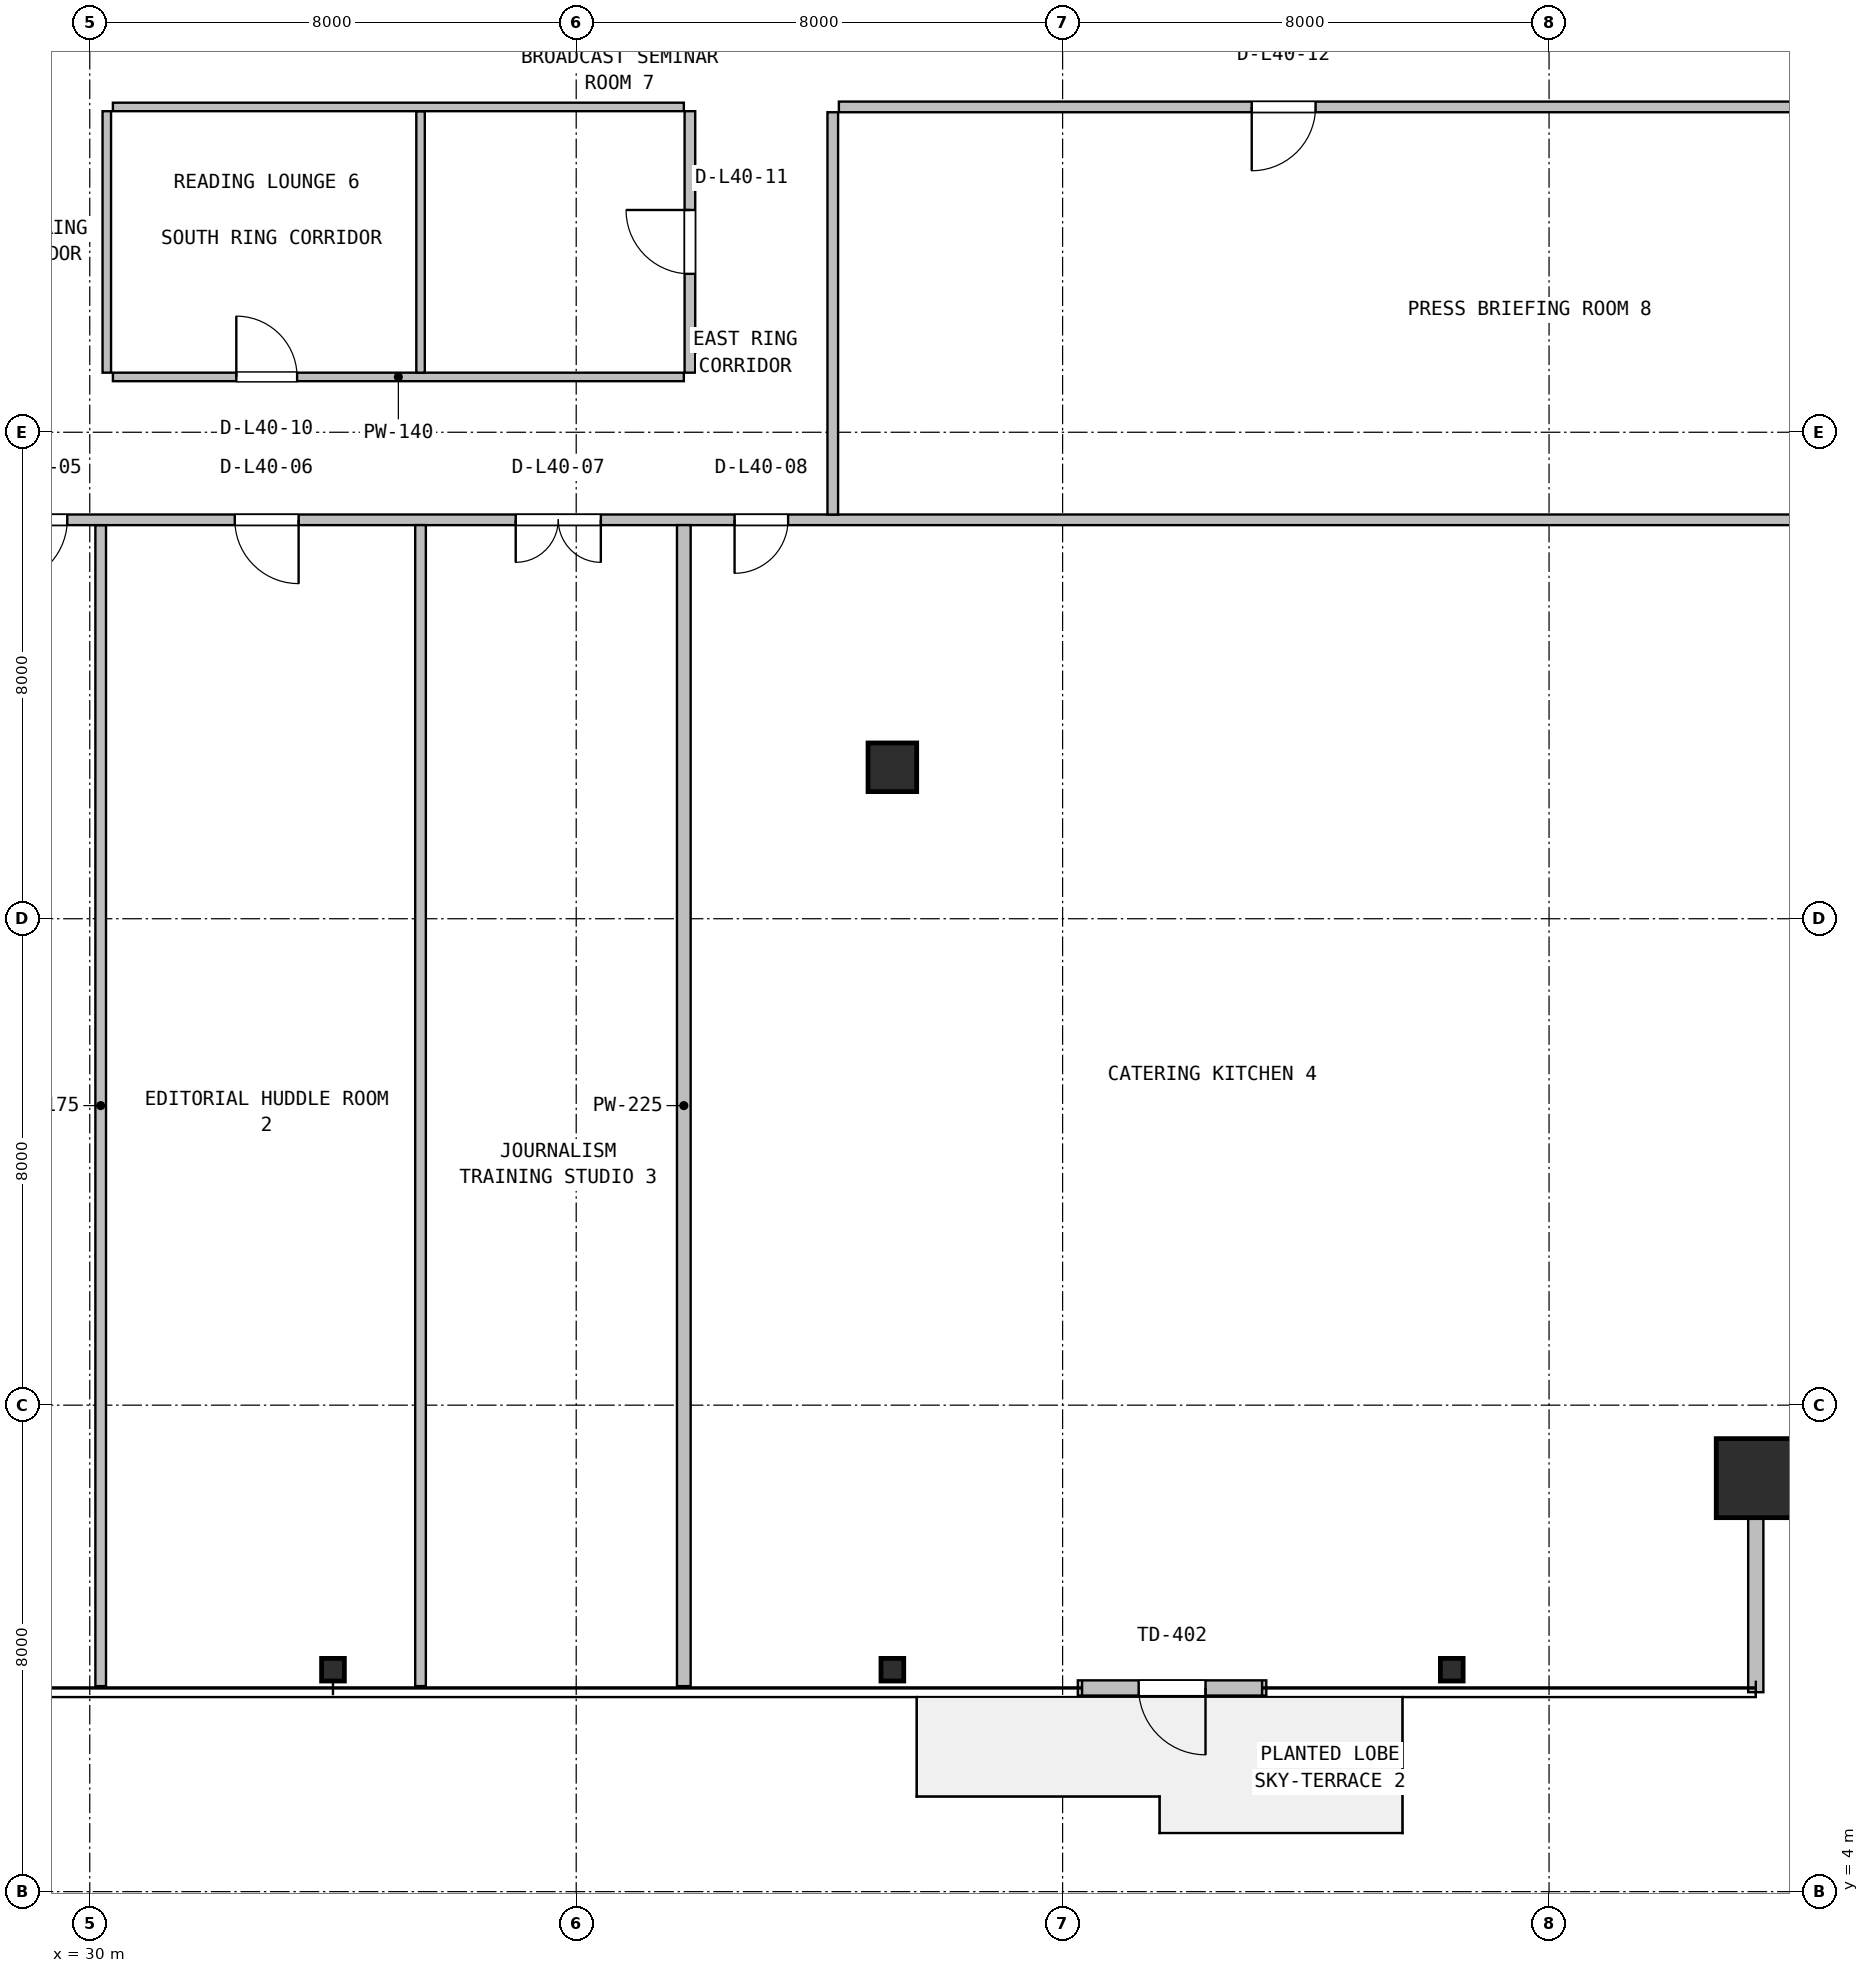
"""IFC4 building model, lengths in metres.
Left out: names, types, materials, properties, quantities, classifications, styles, units other than length and angle.
Written with IfcOpenShell. Run it as: python <this file> out.ifc"""

import sys

from ifc_helpers import new_model, si_unit, direction, frame, frame_2d, origin, origin_2d, place, context, subcontext, project, spatial, rectangle, hollow_rectangle, i_section, extrude, source, transform, mapped, element, fill, save


model = new_model("IFC4")
c1 = context("Model", 3, precision=1e-05, world=origin(), true_north=direction((0.0, 1.0)))
c2 = subcontext(c1, "Body", "Model", "MODEL_VIEW")
j1 = project(units=[si_unit("LENGTHUNIT", "METRE"), si_unit("PLANEANGLEUNIT", "RADIAN")], contexts=[c1])
p1 = place(None, origin())
s1 = spatial("IfcSite", under=j1, at=p1, CompositionType="ELEMENT")
p2 = place(p1, origin())
s2 = spatial("IfcBuilding", under=s1, at=p2, CompositionType="ELEMENT")
p3 = place(p2, frame((0.0, 0.0, 164.8)))
s3 = spatial("IfcBuildingStorey", under=s2, at=p3, CompositionType="ELEMENT", Elevation=164.8)
m1 = source(origin(), c2, "Body", "SweptSolid", [
    extrude(hollow_rectangle(XDim=1.3, YDim=1.3, WallThickness=0.05, at=origin_2d()), origin(), (0.0, 0.0, 1.0), 3.8),
])
p4 = place(p3, frame((57.4, 10.8, 0.0), z_axis=(0.0, 0.0, 1.0), x_axis=(1.0, 0.0, 0.0)))
e1 = element("IfcColumn", 1, at=p4, inside=s3, PredefinedType="COLUMN", context=c2, shape_type="MappedRepresentation", body=[
    mapped(m1, transform((0.0, 0.0, 0.0), x_axis=(1.0, 0.0, 0.0), y_axis=(0.0, 1.0, 0.0), z_axis=(0.0, 0.0, 1.0), scale=1.0)),
])
m2 = source(origin(), c2, "Body", "SweptSolid", [
    extrude(i_section(OverallWidth=0.374, OverallDepth=0.372, WebThickness=0.016, FlangeThickness=0.026, FilletRadius=0.016, at=origin_2d()), origin(), (0.0, 0.0, 1.0), 3.8),
])
for number, where, z_axis, x_axis in (
    (2, (34.0, 7.65, 0.0), (0.0, 0.0, 1.0), (1.0, 0.0, 0.0)),
    (3, (43.2, 7.65, 0.0), (0.0, 0.0, 1.0), (1.0, 0.0, 0.0)),
    (4, (52.4, 7.65, 0.0), (0.0, 0.0, 1.0), (1.0, 0.0, 0.0)),
):
    element("IfcColumn", number, at=place(p3, frame(where, z_axis=z_axis, x_axis=x_axis)), inside=s3, PredefinedType="COLUMN", context=c2, shape_type="MappedRepresentation", body=[
        mapped(m2, transform((0.0, 0.0, 0.0), x_axis=(1.0, 0.0, 0.0), y_axis=(0.0, 1.0, 0.0), z_axis=(0.0, 0.0, 1.0), scale=1.0)),
    ])
m3 = source(origin(), c2, "Body", "SweptSolid", [
    extrude(rectangle(XDim=0.8, YDim=0.8, at=origin_2d()), origin(), (0.0, 0.0, 1.0), 3.8),
])
p5 = place(p3, frame((43.2, 22.49, 0.0), z_axis=(0.0, 0.0, 1.0), x_axis=(1.0, 0.0, 0.0)))
e5 = element("IfcColumn", 5, at=p5, inside=s3, PredefinedType="COLUMN", context=c2, shape_type="MappedRepresentation", body=[
    mapped(m3, transform((0.0, 0.0, 0.0), x_axis=(1.0, 0.0, 0.0), y_axis=(0.0, 1.0, 0.0), z_axis=(0.0, 0.0, 1.0), scale=1.0)),
])
p6 = place(p3, frame((46.25, 7.35, 0.0), z_axis=(0.0, 0.0, 1.0), x_axis=(1.0, 0.0, 0.0)))
e6 = element("IfcWall", 6, at=p6, inside=s3, PredefinedType="SOLIDWALL", context=c2, shape_type="SweptSolid", body=[
    extrude(rectangle(XDim=3.1, YDim=0.25, at=frame_2d((1.55, 0.0))), origin(), (0.0, 0.0, 1.0), 3.53),
])
p7 = place(p6, frame((1.0, 0.0, 0.0)))
e7 = element("IfcOpeningElement", 7, at=p7, cuts=e6, PredefinedType="OPENING", context=c2, shape_type="SweptSolid", body=[
    extrude(rectangle(XDim=1.1, YDim=2.15, at=frame_2d((0.55, 1.075))), frame((0.0, 0.135, 0.0), z_axis=(0.0, -1.0, 0.0), x_axis=(1.0, 0.0, 0.0)), (0.0, 0.0, 1.0), 0.27),
])
p8 = place(p3, frame((57.4, 7.28, 0.0), z_axis=(0.0, 0.0, 1.0), x_axis=(0.0, 1.0, 0.0)))
e8 = element("IfcWall", 8, at=p8, inside=s3, PredefinedType="SOLIDWALL", context=c2, shape_type="SweptSolid", body=[
    extrude(rectangle(XDim=3.6, YDim=0.25, at=frame_2d((1.8, 0.0))), origin(), (0.0, 0.0, 1.0), 3.108),
])
p9 = place(p3, frame((30.18, 7.38, 0.0), z_axis=(0.0, 0.0, 1.0), x_axis=(0.0, 1.0, 0.0)))
e9 = element("IfcWall", 9, at=p9, inside=s3, PredefinedType="PARTITIONING", context=c2, shape_type="SweptSolid", body=[
    extrude(rectangle(XDim=19.093, YDim=0.175, at=frame_2d((9.546, 0.0))), origin(), (0.0, 0.0, 1.0), 2.909),
])
p10 = place(p3, frame((7.18, 26.56, 0.0), z_axis=(0.0, 0.0, 1.0), x_axis=(1.0, 0.0, 0.0)))
e10 = element("IfcWall", 10, at=p10, inside=s3, PredefinedType="PARTITIONING", context=c2, shape_type="SweptSolid", body=[
    extrude(rectangle(XDim=53.64, YDim=0.175, at=frame_2d((26.82, 0.0))), origin(), (0.0, 0.0, 1.0), 2.909),
])
p11 = place(p10, frame((21.4, 0.0, 0.0)))
e11 = element("IfcOpeningElement", 11, at=p11, cuts=e10, PredefinedType="OPENING", context=c2, shape_type="SweptSolid", body=[
    extrude(rectangle(XDim=1.05, YDim=2.1, at=frame_2d((0.525, 1.05))), frame((0.0, 0.098, 0.0), z_axis=(0.0, -1.0, 0.0), x_axis=(1.0, 0.0, 0.0)), (0.0, 0.0, 1.0), 0.195),
])
p12 = place(p10, frame((25.205, 0.0, 0.0)))
e12 = element("IfcOpeningElement", 12, at=p12, cuts=e10, PredefinedType="OPENING", context=c2, shape_type="SweptSolid", body=[
    extrude(rectangle(XDim=1.05, YDim=2.1, at=frame_2d((0.525, 1.05))), frame((0.0, 0.098, 0.0), z_axis=(0.0, -1.0, 0.0), x_axis=(1.0, 0.0, 0.0)), (0.0, 0.0, 1.0), 0.195),
])
p13 = place(p10, frame((29.825, 0.0, 0.0)))
e13 = element("IfcOpeningElement", 13, at=p13, cuts=e10, PredefinedType="OPENING", context=c2, shape_type="SweptSolid", body=[
    extrude(rectangle(XDim=1.4, YDim=2.12, at=frame_2d((0.7, 1.06))), frame((0.0, 0.098, 0.0), z_axis=(0.0, -1.0, 0.0), x_axis=(1.0, 0.0, 0.0)), (0.0, 0.0, 1.0), 0.195),
])
p14 = place(p10, frame((33.425, 0.0, 0.0)))
e14 = element("IfcOpeningElement", 14, at=p14, cuts=e10, PredefinedType="OPENING", context=c2, shape_type="SweptSolid", body=[
    extrude(rectangle(XDim=0.88, YDim=2.06, at=frame_2d((0.44, 1.03))), frame((0.0, 0.098, 0.0), z_axis=(0.0, -1.0, 0.0), x_axis=(1.0, 0.0, 0.0)), (0.0, 0.0, 1.0), 0.195),
])
p15 = place(p3, frame((35.44, 7.38, 0.0), z_axis=(0.0, 0.0, 1.0), x_axis=(0.0, 1.0, 0.0)))
e15 = element("IfcWall", 15, at=p15, inside=s3, PredefinedType="PARTITIONING", context=c2, shape_type="SweptSolid", body=[
    extrude(rectangle(XDim=19.093, YDim=0.175, at=frame_2d((9.546, 0.0))), origin(), (0.0, 0.0, 1.0), 2.909),
])
p16 = place(p3, frame((39.77, 7.38, 0.0), z_axis=(0.0, 0.0, 1.0), x_axis=(0.0, 1.0, 0.0)))
e16 = element("IfcWall", 16, at=p16, inside=s3, PredefinedType="PARTITIONING", context=c2, shape_type="SweptSolid", body=[
    extrude(rectangle(XDim=19.093, YDim=0.225, at=frame_2d((9.546, 0.0))), origin(), (0.0, 0.0, 1.0), 2.909),
])
p17 = place(p3, frame((30.38, 28.91, 0.0), z_axis=(0.0, 0.0, 1.0), x_axis=(1.0, 0.0, 0.0)))
e17 = element("IfcWall", 17, at=p17, inside=s3, PredefinedType="PARTITIONING", context=c2, shape_type="SweptSolid", body=[
    extrude(rectangle(XDim=9.39, YDim=0.14, at=frame_2d((4.695, 0.0))), origin(), (0.0, 0.0, 1.0), 2.909),
])
p18 = place(p17, frame((2.03, 0.0, 0.0)))
e18 = element("IfcOpeningElement", 18, at=p18, cuts=e17, PredefinedType="OPENING", context=c2, shape_type="SweptSolid", body=[
    extrude(rectangle(XDim=1.0, YDim=2.1, at=frame_2d((0.5, 1.05))), frame((0.0, 0.08, 0.0), z_axis=(0.0, -1.0, 0.0), x_axis=(1.0, 0.0, 0.0)), (0.0, 0.0, 1.0), 0.16),
])
p19 = place(p3, frame((35.44, 28.98, 0.0), z_axis=(0.0, 0.0, 1.0), x_axis=(0.0, 1.0, 0.0)))
e19 = element("IfcWall", 19, at=p19, inside=s3, PredefinedType="PARTITIONING", context=c2, shape_type="SweptSolid", body=[
    extrude(rectangle(XDim=4.3, YDim=0.14, at=frame_2d((2.15, 0.0))), origin(), (0.0, 0.0, 1.0), 3.222),
])
p20 = place(p3, frame((30.38, 33.35, 0.0), z_axis=(0.0, 0.0, 1.0), x_axis=(1.0, 0.0, 0.0)))
e20 = element("IfcWall", 20, at=p20, inside=s3, PredefinedType="PARTITIONING", context=c2, shape_type="SweptSolid", body=[
    extrude(rectangle(XDim=9.39, YDim=0.14, at=frame_2d((4.695, 0.0))), origin(), (0.0, 0.0, 1.0), 2.909),
])
p21 = place(p3, frame((30.28, 28.98, 0.0), z_axis=(0.0, 0.0, 1.0), x_axis=(0.0, 1.0, 0.0)))
e21 = element("IfcWall", 21, at=p21, inside=s3, PredefinedType="PARTITIONING", context=c2, shape_type="SweptSolid", body=[
    extrude(rectangle(XDim=4.3, YDim=0.14, at=frame_2d((2.15, 0.0))), origin(), (0.0, 0.0, 1.0), 3.222),
])
p22 = place(p3, frame((39.87, 28.98, 0.0), z_axis=(0.0, 0.0, 1.0), x_axis=(0.0, 1.0, 0.0)))
e22 = element("IfcWall", 22, at=p22, inside=s3, PredefinedType="PARTITIONING", context=c2, shape_type="SweptSolid", body=[
    extrude(rectangle(XDim=4.3, YDim=0.175, at=frame_2d((2.15, 0.0))), origin(), (0.0, 0.0, 1.0), 3.222),
])
p23 = place(p22, frame((1.625, 0.0, 0.0)))
e23 = element("IfcOpeningElement", 23, at=p23, cuts=e22, PredefinedType="OPENING", context=c2, shape_type="SweptSolid", body=[
    extrude(rectangle(XDim=1.05, YDim=2.1, at=frame_2d((0.525, 1.05))), frame((0.0, 0.098, 0.0), z_axis=(0.0, -1.0, 0.0), x_axis=(1.0, 0.0, 0.0)), (0.0, 0.0, 1.0), 0.195),
])
p24 = place(p3, frame((42.32, 33.35, 0.0), z_axis=(0.0, 0.0, 1.0), x_axis=(1.0, 0.0, 0.0)))
e24 = element("IfcWall", 24, at=p24, inside=s3, PredefinedType="PARTITIONING", context=c2, shape_type="SweptSolid", body=[
    extrude(rectangle(XDim=18.5, YDim=0.175, at=frame_2d((9.25, 0.0))), origin(), (0.0, 0.0, 1.0), 2.909),
])
p25 = place(p24, frame((6.79, 0.0, 0.0)))
e25 = element("IfcOpeningElement", 25, at=p25, cuts=e24, PredefinedType="OPENING", context=c2, shape_type="SweptSolid", body=[
    extrude(rectangle(XDim=1.05, YDim=2.1, at=frame_2d((0.525, 1.05))), frame((0.0, 0.098, 0.0), z_axis=(0.0, -1.0, 0.0), x_axis=(1.0, 0.0, 0.0)), (0.0, 0.0, 1.0), 0.195),
])
p26 = place(p3, frame((42.22, 26.647, 0.0), z_axis=(0.0, 0.0, 1.0), x_axis=(0.0, 1.0, 0.0)))
e26 = element("IfcWall", 26, at=p26, inside=s3, PredefinedType="PARTITIONING", context=c2, shape_type="SweptSolid", body=[
    extrude(rectangle(XDim=6.616, YDim=0.175, at=frame_2d((3.308, 0.0))), origin(), (0.0, 0.0, 1.0), 3.222),
])
m4 = source(origin(), c2, "Body", "SweptSolid", [
    extrude(rectangle(XDim=1.1, YDim=2.15, at=frame_2d((0.55, 1.075))), frame((0.0, 0.025, 0.0), z_axis=(0.0, -1.0, 0.0), x_axis=(1.0, 0.0, 0.0)), (0.0, 0.0, 1.0), 0.05),
])
p27 = place(p7, frame((1.1, 0.0, 0.0), z_axis=(0.0, 0.0, 1.0), x_axis=(-1.0, 0.0, 0.0)))
e27 = element("IfcDoor", 27, at=p27, inside=s3, OperationType="SINGLE_SWING_RIGHT", PredefinedType="DOOR", context=c2, shape_type="MappedRepresentation", body=[
    mapped(m4, transform((0.0, 0.0, 0.0), x_axis=(1.0, 0.0, 0.0), y_axis=(0.0, 1.0, 0.0), z_axis=(0.0, 0.0, 1.0), scale=1.0)),
])
fill(e7, e27)
m5 = source(origin(), c2, "Body", "SweptSolid", [
    extrude(rectangle(XDim=1.05, YDim=2.1, at=frame_2d((0.525, 1.05))), frame((0.0, 0.025, 0.0), z_axis=(0.0, -1.0, 0.0), x_axis=(1.0, 0.0, 0.0)), (0.0, 0.0, 1.0), 0.05),
])
p28 = place(p11, frame((1.05, 0.0, 0.0), z_axis=(0.0, 0.0, 1.0), x_axis=(-1.0, 0.0, 0.0)))
e28 = element("IfcDoor", 28, at=p28, inside=s3, OperationType="SINGLE_SWING_LEFT", PredefinedType="DOOR", context=c2, shape_type="MappedRepresentation", body=[
    mapped(m5, transform((0.0, 0.0, 0.0), x_axis=(1.0, 0.0, 0.0), y_axis=(0.0, 1.0, 0.0), z_axis=(0.0, 0.0, 1.0), scale=1.0)),
])
fill(e11, e28)
p29 = place(p12, frame((1.05, 0.0, 0.0), z_axis=(0.0, 0.0, 1.0), x_axis=(-1.0, 0.0, 0.0)))
e29 = element("IfcDoor", 29, at=p29, inside=s3, OperationType="SINGLE_SWING_RIGHT", PredefinedType="DOOR", context=c2, shape_type="MappedRepresentation", body=[
    mapped(m5, transform((0.0, 0.0, 0.0), x_axis=(1.0, 0.0, 0.0), y_axis=(0.0, 1.0, 0.0), z_axis=(0.0, 0.0, 1.0), scale=1.0)),
])
fill(e12, e29)
m6 = source(origin(), c2, "Body", "SweptSolid", [
    extrude(rectangle(XDim=1.4, YDim=2.12, at=frame_2d((0.7, 1.06))), frame((0.0, 0.025, 0.0), z_axis=(0.0, -1.0, 0.0), x_axis=(1.0, 0.0, 0.0)), (0.0, 0.0, 1.0), 0.05),
])
p30 = place(p13, frame((1.4, 0.0, 0.0), z_axis=(0.0, 0.0, 1.0), x_axis=(-1.0, 0.0, 0.0)))
e30 = element("IfcDoor", 30, at=p30, inside=s3, OperationType="DOUBLE_DOOR_SINGLE_SWING", PredefinedType="DOOR", context=c2, shape_type="MappedRepresentation", body=[
    mapped(m6, transform((0.0, 0.0, 0.0), x_axis=(1.0, 0.0, 0.0), y_axis=(0.0, 1.0, 0.0), z_axis=(0.0, 0.0, 1.0), scale=1.0)),
])
fill(e13, e30)
m7 = source(origin(), c2, "Body", "SweptSolid", [
    extrude(rectangle(XDim=0.88, YDim=2.06, at=frame_2d((0.44, 1.03))), frame((0.0, 0.025, 0.0), z_axis=(0.0, -1.0, 0.0), x_axis=(1.0, 0.0, 0.0)), (0.0, 0.0, 1.0), 0.05),
])
p31 = place(p14, frame((0.88, 0.0, 0.0), z_axis=(0.0, 0.0, 1.0), x_axis=(-1.0, 0.0, 0.0)))
e31 = element("IfcDoor", 31, at=p31, inside=s3, OperationType="SINGLE_SWING_LEFT", PredefinedType="DOOR", context=c2, shape_type="MappedRepresentation", body=[
    mapped(m7, transform((0.0, 0.0, 0.0), x_axis=(1.0, 0.0, 0.0), y_axis=(0.0, 1.0, 0.0), z_axis=(0.0, 0.0, 1.0), scale=1.0)),
])
fill(e14, e31)
m8 = source(origin(), c2, "Body", "SweptSolid", [
    extrude(rectangle(XDim=1.0, YDim=2.1, at=frame_2d((0.5, 1.05))), frame((0.0, 0.025, 0.0), z_axis=(0.0, -1.0, 0.0), x_axis=(1.0, 0.0, 0.0)), (0.0, 0.0, 1.0), 0.05),
])
p32 = place(p18, origin())
e32 = element("IfcDoor", 32, at=p32, inside=s3, OperationType="SINGLE_SWING_LEFT", PredefinedType="DOOR", context=c2, shape_type="MappedRepresentation", body=[
    mapped(m8, transform((0.0, 0.0, 0.0), x_axis=(1.0, 0.0, 0.0), y_axis=(0.0, 1.0, 0.0), z_axis=(0.0, 0.0, 1.0), scale=1.0)),
])
fill(e18, e32)
p33 = place(p23, origin())
e33 = element("IfcDoor", 33, at=p33, inside=s3, OperationType="SINGLE_SWING_RIGHT", PredefinedType="DOOR", context=c2, shape_type="MappedRepresentation", body=[
    mapped(m5, transform((0.0, 0.0, 0.0), x_axis=(1.0, 0.0, 0.0), y_axis=(0.0, 1.0, 0.0), z_axis=(0.0, 0.0, 1.0), scale=1.0)),
])
fill(e23, e33)
p34 = place(p25, frame((1.05, 0.0, 0.0), z_axis=(0.0, 0.0, 1.0), x_axis=(-1.0, 0.0, 0.0)))
e34 = element("IfcDoor", 34, at=p34, inside=s3, OperationType="SINGLE_SWING_LEFT", PredefinedType="DOOR", context=c2, shape_type="MappedRepresentation", body=[
    mapped(m5, transform((0.0, 0.0, 0.0), x_axis=(1.0, 0.0, 0.0), y_axis=(0.0, 1.0, 0.0), z_axis=(0.0, 0.0, 1.0), scale=1.0)),
])
fill(e25, e34)
save(model, sys.argv[1])
